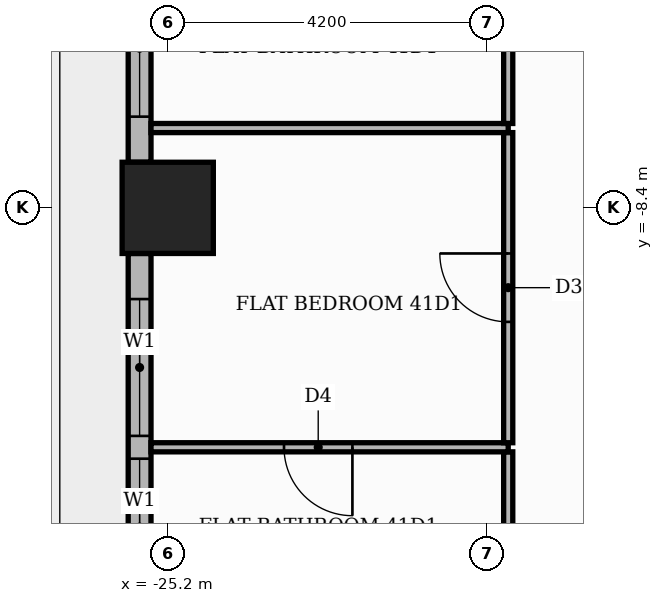
"""IFC4 building model, lengths in metres.
Left out: names, types, materials, properties, quantities, classifications, styles, units other than length and angle.
Written with IfcOpenShell. Run it as: python <this file> out.ifc"""

import sys

from ifc_helpers import new_model, si_unit, direction, frame, frame_2d, origin, origin_2d, place, context, subcontext, project, spatial, rectangle, extrude, element, fill, save


model = new_model("IFC4")
c1 = context("Model", 3, precision=1e-05, world=origin(), true_north=direction((0.0, 1.0)))
c2 = subcontext(c1, "Body", "Model", "MODEL_VIEW")
j1 = project(units=[si_unit("LENGTHUNIT", "METRE"), si_unit("PLANEANGLEUNIT", "RADIAN")], contexts=[c1])
p1 = place(None, origin())
s1 = spatial("IfcSite", under=j1, at=p1, CompositionType="ELEMENT")
p2 = place(p1, origin())
s2 = spatial("IfcBuilding", under=s1, at=p2, CompositionType="ELEMENT")
p3 = place(p2, frame((0.0, 0.0, 172.8)))
s3 = spatial("IfcBuildingStorey", under=s2, at=p3, CompositionType="ELEMENT", Elevation=172.8)
p4 = place(p3, frame((-25.2, -8.4, 0.0), z_axis=(0.0, 0.0, 1.0), x_axis=(1.0, 0.0, 0.0)))
e1 = element("IfcColumn", 1, at=p4, inside=s3, PredefinedType="COLUMN", context=c2, shape_type="SweptSolid", body=[
    extrude(rectangle(XDim=1.2, YDim=1.2, at=origin_2d()), origin(), (0.0, 0.0, 1.0), 3.9),
])
p5 = place(p3, frame((-25.57, -0.6, 0.0), z_axis=(0.0, 0.0, 1.0), x_axis=(0.0, -1.0, 0.0)))
e2 = element("IfcWall", 2, at=p5, inside=s3, PredefinedType="STANDARD", context=c2, shape_type="SweptSolid", body=[
    extrude(rectangle(XDim=7.2, YDim=0.3, at=frame_2d((3.6, 0.0))), origin(), (0.0, 0.0, 1.0), 3.48),
])
p6 = place(p5, frame((0.6, 0.0, 0.9)))
e3 = element("IfcOpeningElement", 3, at=p6, cuts=e2, PredefinedType="OPENING", context=c2, shape_type="SweptSolid", body=[
    extrude(rectangle(XDim=3.9, YDim=2.1, at=frame_2d((1.95, 1.05))), frame((0.0, 0.16, 0.0), z_axis=(0.0, -1.0, 0.0), x_axis=(1.0, 0.0, 0.0)), (0.0, 0.0, 1.0), 0.32),
])
p7 = place(p5, frame((4.8, 0.0, 0.9)))
e4 = element("IfcOpeningElement", 4, at=p7, cuts=e2, PredefinedType="OPENING", context=c2, shape_type="SweptSolid", body=[
    extrude(rectangle(XDim=1.8, YDim=2.1, at=frame_2d((0.9, 1.05))), frame((0.0, 0.16, 0.0), z_axis=(0.0, -1.0, 0.0), x_axis=(1.0, 0.0, 0.0)), (0.0, 0.0, 1.0), 0.32),
])
p8 = place(p3, frame((-25.57, -9.0, 0.0), z_axis=(0.0, 0.0, 1.0), x_axis=(0.0, -1.0, 0.0)))
e5 = element("IfcWall", 5, at=p8, inside=s3, PredefinedType="STANDARD", context=c2, shape_type="SweptSolid", body=[
    extrude(rectangle(XDim=7.2, YDim=0.3, at=frame_2d((3.6, 0.0))), origin(), (0.0, 0.0, 1.0), 3.48),
])
p9 = place(p8, frame((0.6, 0.0, 0.9)))
e6 = element("IfcOpeningElement", 6, at=p9, cuts=e5, PredefinedType="OPENING", context=c2, shape_type="SweptSolid", body=[
    extrude(rectangle(XDim=1.8, YDim=2.1, at=frame_2d((0.9, 1.05))), frame((0.0, 0.16, 0.0), z_axis=(0.0, -1.0, 0.0), x_axis=(1.0, 0.0, 0.0)), (0.0, 0.0, 1.0), 0.32),
])
p10 = place(p8, frame((2.7, 0.0, 0.9)))
e7 = element("IfcOpeningElement", 7, at=p10, cuts=e5, PredefinedType="OPENING", context=c2, shape_type="SweptSolid", body=[
    extrude(rectangle(XDim=1.8, YDim=2.1, at=frame_2d((0.9, 1.05))), frame((0.0, 0.16, 0.0), z_axis=(0.0, -1.0, 0.0), x_axis=(1.0, 0.0, 0.0)), (0.0, 0.0, 1.0), 0.32),
])
p11 = place(p8, frame((4.8, 0.0, 0.9)))
e8 = element("IfcOpeningElement", 8, at=p11, cuts=e5, PredefinedType="OPENING", context=c2, shape_type="SweptSolid", body=[
    extrude(rectangle(XDim=1.8, YDim=2.1, at=frame_2d((0.9, 1.05))), frame((0.0, 0.16, 0.0), z_axis=(0.0, -1.0, 0.0), x_axis=(1.0, 0.0, 0.0)), (0.0, 0.0, 1.0), 0.32),
])
p12 = place(p3, frame((-20.72, -13.55, 0.0), z_axis=(0.0, 0.0, 1.0), x_axis=(0.0, 1.0, 0.0)))
e9 = element("IfcWall", 9, at=p12, inside=s3, PredefinedType="PARTITIONING", context=c2, shape_type="SweptSolid", body=[
    extrude(rectangle(XDim=1.94, YDim=0.12, at=frame_2d((0.97, 0.0))), origin(), (0.0, 0.0, 1.0), 3.48),
])
p13 = place(p3, frame((-25.42, -11.55, 0.0), z_axis=(0.0, 0.0, 1.0), x_axis=(1.0, 0.0, 0.0)))
e10 = element("IfcWall", 10, at=p13, inside=s3, PredefinedType="PARTITIONING", context=c2, shape_type="SweptSolid", body=[
    extrude(rectangle(XDim=4.7, YDim=0.12, at=frame_2d((2.35, 0.0))), origin(), (0.0, 0.0, 1.0), 3.48),
])
p14 = place(p13, frame((1.75, 0.0, 0.0)))
e11 = element("IfcOpeningElement", 11, at=p14, cuts=e10, PredefinedType="OPENING", context=c2, shape_type="SweptSolid", body=[
    extrude(rectangle(XDim=0.9, YDim=2.1, at=frame_2d((0.45, 1.05))), frame((0.0, 0.07, 0.0), z_axis=(0.0, -1.0, 0.0), x_axis=(1.0, 0.0, 0.0)), (0.0, 0.0, 1.0), 0.14),
])
p15 = place(p3, frame((-20.72, -11.49, 0.0), z_axis=(0.0, 0.0, 1.0), x_axis=(0.0, 1.0, 0.0)))
e12 = element("IfcWall", 12, at=p15, inside=s3, PredefinedType="PARTITIONING", context=c2, shape_type="SweptSolid", body=[
    extrude(rectangle(XDim=4.08, YDim=0.12, at=frame_2d((2.04, 0.0))), origin(), (0.0, 0.0, 1.0), 3.48),
])
p16 = place(p15, frame((1.59, 0.0, 0.0)))
e13 = element("IfcOpeningElement", 13, at=p16, cuts=e12, PredefinedType="OPENING", context=c2, shape_type="SweptSolid", body=[
    extrude(rectangle(XDim=0.9, YDim=2.1, at=frame_2d((0.45, 1.05))), frame((0.0, 0.07, 0.0), z_axis=(0.0, -1.0, 0.0), x_axis=(1.0, 0.0, 0.0)), (0.0, 0.0, 1.0), 0.14),
])
p17 = place(p3, frame((-25.42, -7.35, 0.0), z_axis=(0.0, 0.0, 1.0), x_axis=(1.0, 0.0, 0.0)))
e14 = element("IfcWall", 14, at=p17, inside=s3, PredefinedType="PARTITIONING", context=c2, shape_type="SweptSolid", body=[
    extrude(rectangle(XDim=4.7, YDim=0.12, at=frame_2d((2.35, 0.0))), origin(), (0.0, 0.0, 1.0), 3.48),
])
p18 = place(p3, frame((-20.72, -7.29, 0.0), z_axis=(0.0, 0.0, 1.0), x_axis=(0.0, 1.0, 0.0)))
e15 = element("IfcWall", 15, at=p18, inside=s3, PredefinedType="PARTITIONING", context=c2, shape_type="SweptSolid", body=[
    extrude(rectangle(XDim=1.98, YDim=0.12, at=frame_2d((0.99, 0.0))), origin(), (0.0, 0.0, 1.0), 3.48),
])
p19 = place(p7, origin())
e16 = element("IfcWindow", 16, at=p19, inside=s3, PartitioningType="SINGLE_PANEL", PredefinedType="WINDOW", context=c2, shape_type="SweptSolid", body=[
    extrude(rectangle(XDim=1.8, YDim=2.1, at=frame_2d((0.9, 1.05))), frame((0.0, 0.03, 0.0), z_axis=(0.0, -1.0, 0.0), x_axis=(1.0, 0.0, 0.0)), (0.0, 0.0, 1.0), 0.06),
])
fill(e4, e16)
p20 = place(p9, origin())
e17 = element("IfcWindow", 17, at=p20, inside=s3, PartitioningType="SINGLE_PANEL", PredefinedType="WINDOW", context=c2, shape_type="SweptSolid", body=[
    extrude(rectangle(XDim=1.8, YDim=2.1, at=frame_2d((0.9, 1.05))), frame((0.0, 0.03, 0.0), z_axis=(0.0, -1.0, 0.0), x_axis=(1.0, 0.0, 0.0)), (0.0, 0.0, 1.0), 0.06),
])
fill(e6, e17)
p21 = place(p10, origin())
e18 = element("IfcWindow", 18, at=p21, inside=s3, PartitioningType="SINGLE_PANEL", PredefinedType="WINDOW", context=c2, shape_type="SweptSolid", body=[
    extrude(rectangle(XDim=1.8, YDim=2.1, at=frame_2d((0.9, 1.05))), frame((0.0, 0.03, 0.0), z_axis=(0.0, -1.0, 0.0), x_axis=(1.0, 0.0, 0.0)), (0.0, 0.0, 1.0), 0.06),
])
fill(e7, e18)
p22 = place(p16, origin())
e19 = element("IfcDoor", 19, at=p22, inside=s3, OperationType="SINGLE_SWING_RIGHT", PredefinedType="DOOR", context=c2, shape_type="SweptSolid", body=[
    extrude(rectangle(XDim=0.9, YDim=2.1, at=frame_2d((0.45, 1.05))), frame((0.0, 0.025, 0.0), z_axis=(0.0, -1.0, 0.0), x_axis=(1.0, 0.0, 0.0)), (0.0, 0.0, 1.0), 0.05),
])
fill(e13, e19)
p23 = place(p14, frame((0.9, 0.0, 0.0), z_axis=(0.0, 0.0, 1.0), x_axis=(-1.0, 0.0, 0.0)))
e20 = element("IfcDoor", 20, at=p23, inside=s3, OperationType="SINGLE_SWING_RIGHT", PredefinedType="DOOR", context=c2, shape_type="SweptSolid", body=[
    extrude(rectangle(XDim=0.9, YDim=2.1, at=frame_2d((0.45, 1.05))), frame((0.0, 0.025, 0.0), z_axis=(0.0, -1.0, 0.0), x_axis=(1.0, 0.0, 0.0)), (0.0, 0.0, 1.0), 0.05),
])
fill(e11, e20)
save(model, sys.argv[1])
